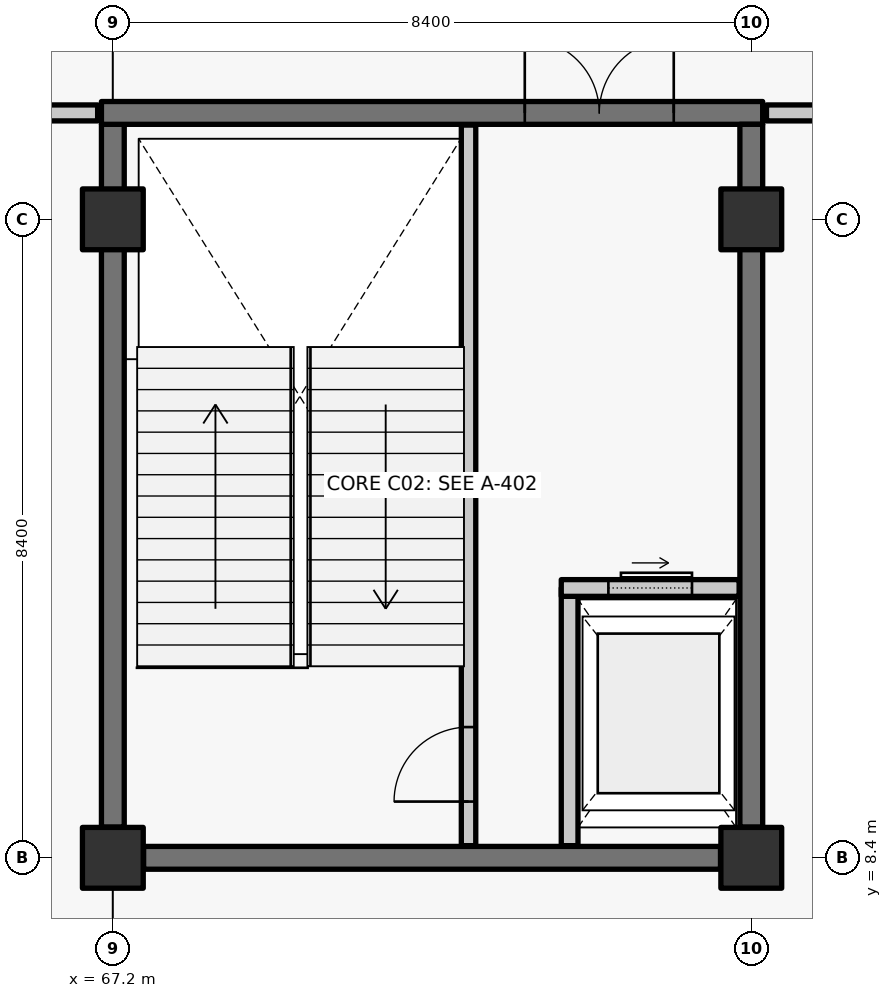
"""IFC4 building model, lengths in metres.
Left out: names, types, materials, properties, quantities, classifications, styles, units other than length and angle.
Written with IfcOpenShell. Run it as: python <this file> out.ifc"""

import sys

from ifc_helpers import new_model, si_unit, direction, frame, frame_2d, origin, origin_2d, place, context, subcontext, project, spatial, rectangle, extrude, element, fill, save


model = new_model("IFC4")
c1 = context("Model", 3, precision=1e-05, world=origin(), true_north=direction((0.0, 1.0)))
c2 = subcontext(c1, "Body", "Model", "MODEL_VIEW")
j1 = project(units=[si_unit("LENGTHUNIT", "METRE"), si_unit("PLANEANGLEUNIT", "RADIAN")], contexts=[c1])
p1 = place(None, origin())
s1 = spatial("IfcSite", under=j1, at=p1, CompositionType="ELEMENT")
p2 = place(p1, origin())
s2 = spatial("IfcBuilding", under=s1, at=p2, CompositionType="ELEMENT")
p3 = place(p2, frame((0.0, 0.0, 6.0)))
s3 = spatial("IfcBuildingStorey", under=s2, at=p3, CompositionType="ELEMENT", Elevation=6.0)
for number, where, z_axis, x_axis in (
    (1, (67.2, 8.4, 0.0), (0.0, 0.0, 1.0), (1.0, 0.0, 0.0)),
    (2, (67.2, 16.8, 0.0), (0.0, 0.0, 1.0), (1.0, 0.0, 0.0)),
    (3, (75.6, 8.4, 0.0), (0.0, 0.0, 1.0), (1.0, 0.0, 0.0)),
    (4, (75.6, 16.8, 0.0), (0.0, 0.0, 1.0), (1.0, 0.0, 0.0)),
):
    element("IfcColumn", number, at=place(p3, frame(where, z_axis=z_axis, x_axis=x_axis)), inside=s3, PredefinedType="COLUMN", context=c2, shape_type="SweptSolid", body=[
        extrude(rectangle(XDim=0.8, YDim=0.8, at=origin_2d()), origin(), (0.0, 0.0, 1.0), 5.4),
    ])
p4 = place(p3, frame((75.195, 8.4, 0.0), z_axis=(0.0, 0.0, 1.0), x_axis=(-1.0, 0.0, 0.0)))
e5 = element("IfcWall", 5, at=p4, inside=s3, PredefinedType="SHEAR", context=c2, shape_type="SweptSolid", body=[
    extrude(rectangle(XDim=7.59, YDim=0.3, at=frame_2d((3.795, 0.0))), origin(), (0.0, 0.0, 1.0), 5.12),
])
p5 = place(p3, frame((67.2, 8.805, 0.0), z_axis=(0.0, 0.0, 1.0), x_axis=(0.0, 1.0, 0.0)))
e6 = element("IfcWall", 6, at=p5, inside=s3, PredefinedType="SHEAR", context=c2, shape_type="SweptSolid", body=[
    extrude(rectangle(XDim=9.245, YDim=0.3, at=frame_2d((4.623, 0.0))), origin(), (0.0, 0.0, 1.0), 5.12),
])
p6 = place(p3, frame((67.05, 18.2, 0.0), z_axis=(0.0, 0.0, 1.0), x_axis=(1.0, 0.0, 0.0)))
e7 = element("IfcWall", 7, at=p6, inside=s3, PredefinedType="SHEAR", context=c2, shape_type="SweptSolid", body=[
    extrude(rectangle(XDim=8.7, YDim=0.3, at=frame_2d((4.35, 0.0))), origin(), (0.0, 0.0, 1.0), 5.12),
])
p7 = place(p6, frame((5.57, 0.0, 0.0)))
e8 = element("IfcOpeningElement", 8, at=p7, cuts=e7, PredefinedType="OPENING", context=c2, shape_type="SweptSolid", body=[
    extrude(rectangle(XDim=1.96, YDim=2.2, at=frame_2d((0.98, 1.1))), frame((0.0, 0.16, 0.0), z_axis=(0.0, -1.0, 0.0), x_axis=(1.0, 0.0, 0.0)), (0.0, 0.0, 1.0), 0.32),
])
p8 = place(p3, frame((75.6, 18.05, 0.0), z_axis=(0.0, 0.0, 1.0), x_axis=(0.0, -1.0, 0.0)))
e9 = element("IfcWall", 9, at=p8, inside=s3, PredefinedType="SHEAR", context=c2, shape_type="SweptSolid", body=[
    extrude(rectangle(XDim=9.245, YDim=0.3, at=frame_2d((4.623, 0.0))), origin(), (0.0, 0.0, 1.0), 5.12),
])
p9 = place(p3, frame((71.88, 8.56, 0.0), z_axis=(0.0, 0.0, 1.0), x_axis=(0.0, 1.0, 0.0)))
e10 = element("IfcWall", 10, at=p9, inside=s3, PredefinedType="SOLIDWALL", context=c2, shape_type="SweptSolid", body=[
    extrude(rectangle(XDim=9.48, YDim=0.19, at=frame_2d((4.74, 0.0))), origin(), (0.0, 0.0, 1.0), 5.12),
])
p10 = place(p9, frame((0.58, 0.0, 0.0)))
e11 = element("IfcOpeningElement", 11, at=p10, cuts=e10, PredefinedType="OPENING", context=c2, shape_type="SweptSolid", body=[
    extrude(rectangle(XDim=0.98, YDim=2.15, at=frame_2d((0.49, 1.075))), frame((0.0, 0.105, 0.0), z_axis=(0.0, -1.0, 0.0), x_axis=(1.0, 0.0, 0.0)), (0.0, 0.0, 1.0), 0.21),
])
p11 = place(p3, frame((73.21, 8.56, 0.0), z_axis=(0.0, 0.0, 1.0), x_axis=(0.0, 1.0, 0.0)))
e12 = element("IfcWall", 12, at=p11, inside=s3, PredefinedType="SOLIDWALL", context=c2, shape_type="SweptSolid", body=[
    extrude(rectangle(XDim=3.39, YDim=0.22, at=frame_2d((1.695, 0.0))), origin(), (0.0, 0.0, 1.0), 5.12),
])
p12 = place(p3, frame((73.1, 11.95, 0.0), z_axis=(0.0, 0.0, 1.0), x_axis=(1.0, 0.0, 0.0)))
e13 = element("IfcWall", 13, at=p12, inside=s3, PredefinedType="SOLIDWALL", context=c2, shape_type="SweptSolid", body=[
    extrude(rectangle(XDim=2.34, YDim=0.22, at=frame_2d((1.17, 0.0))), origin(), (0.0, 0.0, 1.0), 5.12),
])
p13 = place(p12, frame((0.62, 0.0, 0.0)))
e14 = element("IfcOpeningElement", 14, at=p13, cuts=e13, PredefinedType="OPENING", context=c2, shape_type="SweptSolid", body=[
    extrude(rectangle(XDim=1.1, YDim=2.2, at=frame_2d((0.55, 1.1))), frame((0.0, 0.12, 0.0), z_axis=(0.0, -1.0, 0.0), x_axis=(1.0, 0.0, 0.0)), (0.0, 0.0, 1.0), 0.24),
])
p14 = place(p3, frame((33.8, 18.2, 0.0), z_axis=(0.0, 0.0, 1.0), x_axis=(1.0, 0.0, 0.0)))
e15 = element("IfcWall", 15, at=p14, inside=s3, PredefinedType="PARTITIONING", context=c2, shape_type="SweptSolid", body=[
    extrude(rectangle(XDim=33.2, YDim=0.21, at=frame_2d((16.6, 0.0))), origin(), (0.0, 0.0, 1.0), 5.12),
])
p15 = place(p14, frame((3.5, 0.0, 0.0)))
e16 = element("IfcOpeningElement", 16, at=p15, cuts=e15, PredefinedType="OPENING", context=c2, shape_type="SweptSolid", body=[
    extrude(rectangle(XDim=1.0, YDim=2.15, at=frame_2d((0.5, 1.075))), frame((0.0, 0.115, 0.0), z_axis=(0.0, -1.0, 0.0), x_axis=(1.0, 0.0, 0.0)), (0.0, 0.0, 1.0), 0.23),
])
p16 = place(p14, frame((20.3, 0.0, 0.0)))
e17 = element("IfcOpeningElement", 17, at=p16, cuts=e15, PredefinedType="OPENING", context=c2, shape_type="SweptSolid", body=[
    extrude(rectangle(XDim=1.0, YDim=2.15, at=frame_2d((0.5, 1.075))), frame((0.0, 0.115, 0.0), z_axis=(0.0, -1.0, 0.0), x_axis=(1.0, 0.0, 0.0)), (0.0, 0.0, 1.0), 0.23),
])
p17 = place(p3, frame((75.8, 18.2, 0.0), z_axis=(0.0, 0.0, 1.0), x_axis=(1.0, 0.0, 0.0)))
e18 = element("IfcWall", 18, at=p17, inside=s3, PredefinedType="PARTITIONING", context=c2, shape_type="SweptSolid", body=[
    extrude(rectangle(XDim=16.4, YDim=0.21, at=frame_2d((8.2, 0.0))), origin(), (0.0, 0.0, 1.0), 5.12),
])
p18 = place(p17, frame((3.5, 0.0, 0.0)))
e19 = element("IfcOpeningElement", 19, at=p18, cuts=e18, PredefinedType="OPENING", context=c2, shape_type="SweptSolid", body=[
    extrude(rectangle(XDim=1.0, YDim=2.15, at=frame_2d((0.5, 1.075))), frame((0.0, 0.115, 0.0), z_axis=(0.0, -1.0, 0.0), x_axis=(1.0, 0.0, 0.0)), (0.0, 0.0, 1.0), 0.23),
])
p19 = place(p17, frame((11.9, 0.0, 0.0)))
e20 = element("IfcOpeningElement", 20, at=p19, cuts=e18, PredefinedType="OPENING", context=c2, shape_type="SweptSolid", body=[
    extrude(rectangle(XDim=1.0, YDim=2.15, at=frame_2d((0.5, 1.075))), frame((0.0, 0.115, 0.0), z_axis=(0.0, -1.0, 0.0), x_axis=(1.0, 0.0, 0.0)), (0.0, 0.0, 1.0), 0.23),
])
p20 = place(p10, origin())
e21 = element("IfcDoor", 21, at=p20, inside=s3, OperationType="SINGLE_SWING_LEFT", PredefinedType="DOOR", context=c2, shape_type="SweptSolid", body=[
    extrude(rectangle(XDim=0.98, YDim=2.15, at=frame_2d((0.49, 1.075))), frame((0.0, 0.025, 0.0), z_axis=(0.0, -1.0, 0.0), x_axis=(1.0, 0.0, 0.0)), (0.0, 0.0, 1.0), 0.05),
])
fill(e11, e21)
p21 = place(p7, origin())
e22 = element("IfcDoor", 22, at=p21, inside=s3, OperationType="DOUBLE_DOOR_SINGLE_SWING", PredefinedType="DOOR", context=c2, shape_type="SweptSolid", body=[
    extrude(rectangle(XDim=1.96, YDim=2.2, at=frame_2d((0.98, 1.1))), frame((0.0, 0.025, 0.0), z_axis=(0.0, -1.0, 0.0), x_axis=(1.0, 0.0, 0.0)), (0.0, 0.0, 1.0), 0.05),
])
fill(e8, e22)
p22 = place(p13, origin())
e23 = element("IfcDoor", 23, at=p22, inside=s3, OperationType="SLIDING_TO_RIGHT", PredefinedType="DOOR", context=c2, shape_type="SweptSolid", body=[
    extrude(rectangle(XDim=1.1, YDim=2.2, at=frame_2d((0.55, 1.1))), frame((0.0, 0.025, 0.0), z_axis=(0.0, -1.0, 0.0), x_axis=(1.0, 0.0, 0.0)), (0.0, 0.0, 1.0), 0.05),
])
fill(e14, e23)
save(model, sys.argv[1])
